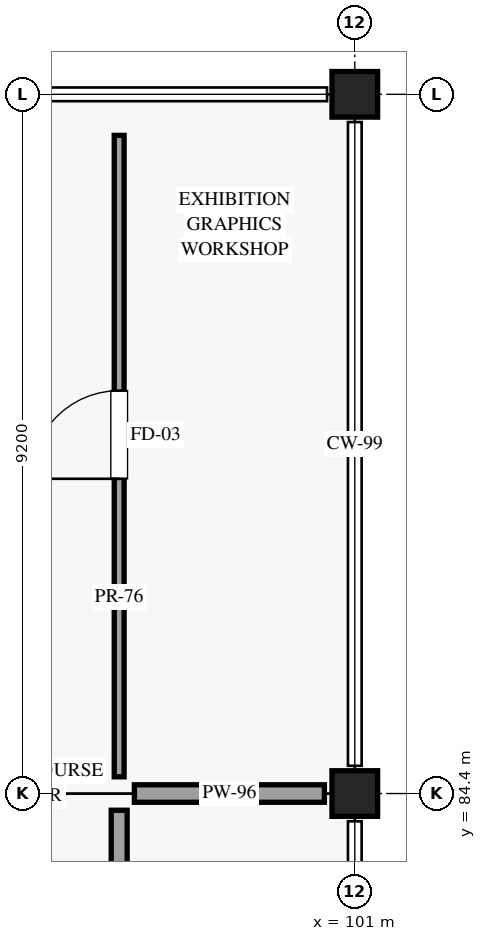
"""IFC4 building model, lengths in metres.
Left out: names, types, materials, properties, quantities, classifications, styles, units other than length and angle.
Written with IfcOpenShell. Run it as: python <this file> out.ifc"""

import sys

from ifc_helpers import new_model, si_unit, direction, frame, frame_2d, origin, origin_2d, place, context, subcontext, project, spatial, rectangle, extrude, element, fill, save


model = new_model("IFC4")
c1 = context("Model", 3, precision=1e-05, world=origin(), true_north=direction((0.0, 1.0)))
c2 = subcontext(c1, "Body", "Model", "MODEL_VIEW")
j1 = project(units=[si_unit("LENGTHUNIT", "METRE"), si_unit("PLANEANGLEUNIT", "RADIAN")], contexts=[c1])
p1 = place(None, origin())
s1 = spatial("IfcSite", under=j1, at=p1, CompositionType="ELEMENT")
p2 = place(p1, origin())
s2 = spatial("IfcBuilding", under=s1, at=p2, CompositionType="ELEMENT")
p3 = place(p2, frame((0.0, 0.0, 10.2)))
s3 = spatial("IfcBuildingStorey", under=s2, at=p3, CompositionType="ELEMENT", Elevation=10.2)
for number, where, z_axis, x_axis in (
    (1, (101.0, 84.4, 0.0), (0.0, 0.0, 1.0), (1.0, 0.0, 0.0)),
    (2, (101.0, 93.6, 0.0), (0.0, 0.0, 1.0), (1.0, 0.0, 0.0)),
):
    element("IfcColumn", number, at=place(p3, frame(where, z_axis=z_axis, x_axis=x_axis)), inside=s3, PredefinedType="COLUMN", context=c2, shape_type="SweptSolid", body=[
        extrude(rectangle(XDim=0.6, YDim=0.6, at=origin_2d()), origin(), (0.0, 0.0, 1.0), 4.8),
    ])
p4 = place(p3, frame((97.9, 66.22, 0.0), z_axis=(0.0, 0.0, 1.0), x_axis=(0.0, 1.0, 0.0)))
e3 = element("IfcWall", 3, at=p4, inside=s3, PredefinedType="PARTITIONING", context=c2, shape_type="SweptSolid", body=[
    extrude(rectangle(XDim=17.96, YDim=0.21, at=frame_2d((8.98, 0.0))), origin(), (0.0, 0.0, 1.0), 3.925),
])
p5 = place(p4, frame((3.936, 0.0, 0.0)))
e4 = element("IfcOpeningElement", 4, at=p5, cuts=e3, PredefinedType="OPENING", context=c2, shape_type="SweptSolid", body=[
    extrude(rectangle(XDim=1.08, YDim=2.24, at=frame_2d((0.54, 1.12))), frame((0.0, 0.115, 0.0), z_axis=(0.0, -1.0, 0.0), x_axis=(1.0, 0.0, 0.0)), (0.0, 0.0, 1.0), 0.23),
])
p6 = place(p3, frame((98.1, 84.4, 0.0), z_axis=(0.0, 0.0, 1.0), x_axis=(1.0, 0.0, 0.0)))
e5 = element("IfcWall", 5, at=p6, inside=s3, PredefinedType="PARTITIONING", context=c2, shape_type="SweptSolid", body=[
    extrude(rectangle(XDim=2.5, YDim=0.23, at=frame_2d((1.25, 0.0))), origin(), (0.0, 0.0, 1.0), 3.925),
])
p7 = place(p3, frame((97.9, 84.62, 0.0), z_axis=(0.0, 0.0, 1.0), x_axis=(0.0, 1.0, 0.0)))
e6 = element("IfcWall", 6, at=p7, inside=s3, PredefinedType="PARTITIONING", context=c2, shape_type="SweptSolid", body=[
    extrude(rectangle(XDim=8.44, YDim=0.13, at=frame_2d((4.22, 0.0))), origin(), (0.0, 0.0, 1.0), 3.925),
])
p8 = place(p7, frame((3.921, 0.0, 0.0)))
e7 = element("IfcOpeningElement", 7, at=p8, cuts=e6, PredefinedType="OPENING", context=c2, shape_type="SweptSolid", body=[
    extrude(rectangle(XDim=1.16, YDim=2.28, at=frame_2d((0.58, 1.14))), frame((0.0, 0.075, 0.0), z_axis=(0.0, -1.0, 0.0), x_axis=(1.0, 0.0, 0.0)), (0.0, 0.0, 1.0), 0.15),
])
p9 = place(p8, origin())
e8 = element("IfcDoor", 8, at=p9, inside=s3, OperationType="SINGLE_SWING_LEFT", PredefinedType="DOOR", context=c2, shape_type="SweptSolid", body=[
    extrude(rectangle(XDim=1.16, YDim=2.28, at=frame_2d((0.58, 1.14))), frame((0.0, 0.025, 0.0), z_axis=(0.0, -1.0, 0.0), x_axis=(1.0, 0.0, 0.0)), (0.0, 0.0, 1.0), 0.05),
])
fill(e7, e8)
save(model, sys.argv[1])
